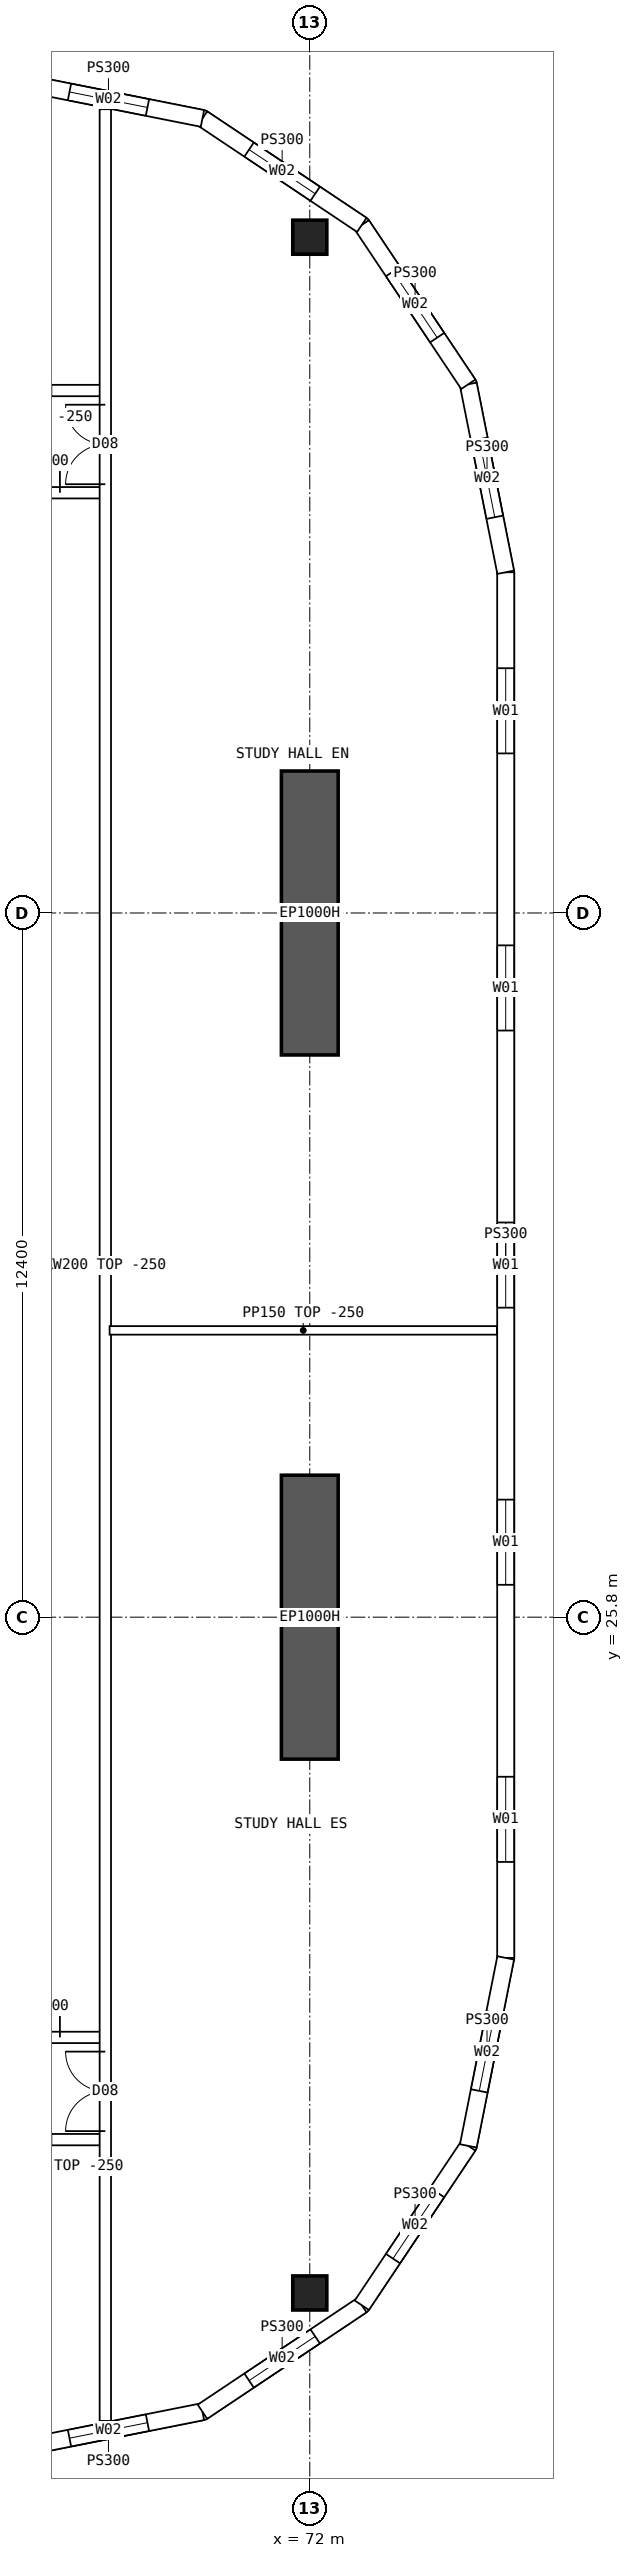
"""IFC4 building model, lengths in metres.
Left out: names, types, materials, properties, quantities, classifications, styles, units other than length and angle.
Written with IfcOpenShell. Run it as: python <this file> out.ifc"""

import sys

from ifc_helpers import new_model, si_unit, direction, frame, frame_2d, origin, origin_2d, place, context, subcontext, project, spatial, polyline, rectangle, hollow_rectangle, outline, extrude, element, fill, save


model = new_model("IFC4")
c1 = context("Model", 3, precision=1e-05, world=origin(), true_north=direction((0.0, 1.0)))
c2 = subcontext(c1, "Body", "Model", "MODEL_VIEW")
j1 = project(units=[si_unit("LENGTHUNIT", "METRE"), si_unit("PLANEANGLEUNIT", "RADIAN")], contexts=[c1])
p1 = place(None, origin())
s1 = spatial("IfcSite", under=j1, at=p1, CompositionType="ELEMENT")
p2 = place(p1, origin())
s2 = spatial("IfcBuilding", under=s1, at=p2, CompositionType="ELEMENT")
p3 = place(p2, frame((0.0, 0.0, 235.3)))
s3 = spatial("IfcBuildingStorey", under=s2, at=p3, CompositionType="ELEMENT", Elevation=235.3)
for number, where, z_axis, x_axis in (
    (1, (72.0, 13.9, 0.0), (0.0, 0.0, 1.0), (1.0, 0.0, 0.0)),
    (2, (72.0, 50.1, 0.0), (0.0, 0.0, 1.0), (1.0, 0.0, 0.0)),
):
    element("IfcColumn", number, at=place(p3, frame(where, z_axis=z_axis, x_axis=x_axis)), inside=s3, PredefinedType="COLUMN", context=c2, shape_type="SweptSolid", body=[
        extrude(hollow_rectangle(XDim=0.6, YDim=0.6, WallThickness=0.06, at=origin_2d()), origin(), (0.0, 0.0, 1.0), 3.75),
    ])
for number, where, z_axis, x_axis in (
    (3, (72.0, 23.3, 0.0), (0.0, 0.0, 1.0), (0.0, 1.0, 0.0)),
    (4, (72.0, 35.7, 0.0), (0.0, 0.0, 1.0), (0.0, 1.0, 0.0)),
):
    element("IfcWall", number, at=place(p3, frame(where, z_axis=z_axis, x_axis=x_axis)), inside=s3, PredefinedType="SHEAR", context=c2, shape_type="SweptSolid", body=[
        extrude(rectangle(XDim=5.0, YDim=1.0, at=frame_2d((2.5, 0.0))), origin(), (0.0, 0.0, 1.0), 3.75),
    ])
p4 = place(p3, frame((75.45, 19.8, 0.0), z_axis=(0.0, 0.0, 1.0), x_axis=(0.0, 1.0, 0.0)))
e5 = element("IfcWall", 5, at=p4, inside=s3, PredefinedType="SOLIDWALL", context=c2, shape_type="SweptSolid", body=[
    extrude(outline(polyline([(-0.015, -0.15), (24.415, -0.15), (24.385, 0.15), (0.015, 0.15), (-0.015, -0.15)])), origin(), (0.0, 0.0, 1.0), 3.5),
])
p5 = place(p4, frame((1.69, 0.0, 0.9)))
e6 = element("IfcOpeningElement", 6, at=p5, cuts=e5, PredefinedType="OPENING", context=c2, shape_type="SweptSolid", body=[
    extrude(rectangle(XDim=1.5, YDim=2.0, at=frame_2d((0.75, 1.0))), frame((0.0, 0.16, 0.0), z_axis=(0.0, -1.0, 0.0), x_axis=(1.0, 0.0, 0.0)), (0.0, 0.0, 1.0), 0.32),
])
p6 = place(p4, frame((6.57, 0.0, 0.9)))
e7 = element("IfcOpeningElement", 7, at=p6, cuts=e5, PredefinedType="OPENING", context=c2, shape_type="SweptSolid", body=[
    extrude(rectangle(XDim=1.5, YDim=2.0, at=frame_2d((0.75, 1.0))), frame((0.0, 0.16, 0.0), z_axis=(0.0, -1.0, 0.0), x_axis=(1.0, 0.0, 0.0)), (0.0, 0.0, 1.0), 0.32),
])
p7 = place(p4, frame((11.45, 0.0, 0.9)))
e8 = element("IfcOpeningElement", 8, at=p7, cuts=e5, PredefinedType="OPENING", context=c2, shape_type="SweptSolid", body=[
    extrude(rectangle(XDim=1.5, YDim=2.0, at=frame_2d((0.75, 1.0))), frame((0.0, 0.16, 0.0), z_axis=(0.0, -1.0, 0.0), x_axis=(1.0, 0.0, 0.0)), (0.0, 0.0, 1.0), 0.32),
])
p8 = place(p4, frame((16.33, 0.0, 0.9)))
e9 = element("IfcOpeningElement", 9, at=p8, cuts=e5, PredefinedType="OPENING", context=c2, shape_type="SweptSolid", body=[
    extrude(rectangle(XDim=1.5, YDim=2.0, at=frame_2d((0.75, 1.0))), frame((0.0, 0.16, 0.0), z_axis=(0.0, -1.0, 0.0), x_axis=(1.0, 0.0, 0.0)), (0.0, 0.0, 1.0), 0.32),
])
p9 = place(p4, frame((21.21, 0.0, 0.9)))
e10 = element("IfcOpeningElement", 10, at=p9, cuts=e5, PredefinedType="OPENING", context=c2, shape_type="SweptSolid", body=[
    extrude(rectangle(XDim=1.5, YDim=2.0, at=frame_2d((0.75, 1.0))), frame((0.0, 0.16, 0.0), z_axis=(0.0, -1.0, 0.0), x_axis=(1.0, 0.0, 0.0)), (0.0, 0.0, 1.0), 0.32),
])
p10 = place(p3, frame((66.8, 11.15, 0.0), z_axis=(0.0, 0.0, 1.0), x_axis=(0.98078325777, 0.195100490205, 0.0)))
e11 = element("IfcWall", 11, at=p10, inside=s3, PredefinedType="SOLIDWALL", context=c2, shape_type="SweptSolid", body=[
    extrude(outline(polyline([(-0.03, -0.15), (3.405, -0.15), (3.345, 0.15), (0.03, 0.15), (-0.03, -0.15)])), origin(), (0.0, 0.0, 1.0), 3.5),
])
p11 = place(p10, frame((0.988, 0.0, 0.9)))
e12 = element("IfcOpeningElement", 12, at=p11, cuts=e11, PredefinedType="OPENING", context=c2, shape_type="SweptSolid", body=[
    extrude(rectangle(XDim=1.4, YDim=1.8, at=frame_2d((0.7, 0.9))), frame((0.0, 0.16, 0.0), z_axis=(0.0, -1.0, 0.0), x_axis=(1.0, 0.0, 0.0)), (0.0, 0.0, 1.0), 0.32),
])
p12 = place(p3, frame((70.11, 11.808, 0.0), z_axis=(0.0, 0.0, 1.0), x_axis=(0.831460037396, 0.555584562613, 0.0)))
e13 = element("IfcWall", 13, at=p12, inside=s3, PredefinedType="SOLIDWALL", context=c2, shape_type="SweptSolid", body=[
    extrude(outline(polyline([(-0.03, -0.15), (3.405, -0.15), (3.345, 0.15), (0.03, 0.15), (-0.03, -0.15)])), origin(), (0.0, 0.0, 1.0), 3.5),
])
p13 = place(p12, frame((0.988, 0.0, 0.9)))
e14 = element("IfcOpeningElement", 14, at=p13, cuts=e13, PredefinedType="OPENING", context=c2, shape_type="SweptSolid", body=[
    extrude(rectangle(XDim=1.4, YDim=1.8, at=frame_2d((0.7, 0.9))), frame((0.0, 0.16, 0.0), z_axis=(0.0, -1.0, 0.0), x_axis=(1.0, 0.0, 0.0)), (0.0, 0.0, 1.0), 0.32),
])
p14 = place(p3, frame((72.917, 13.684, 0.0), z_axis=(0.0, 0.0, 1.0), x_axis=(0.555567969291, 0.831471124873, 0.0)))
e15 = element("IfcWall", 15, at=p14, inside=s3, PredefinedType="SOLIDWALL", context=c2, shape_type="SweptSolid", body=[
    extrude(outline(polyline([(-0.03, -0.15), (3.405, -0.15), (3.345, 0.15), (0.03, 0.15), (-0.03, -0.15)])), origin(), (0.0, 0.0, 1.0), 3.5),
])
p15 = place(p14, frame((0.988, 0.0, 0.9)))
e16 = element("IfcOpeningElement", 16, at=p15, cuts=e15, PredefinedType="OPENING", context=c2, shape_type="SweptSolid", body=[
    extrude(rectangle(XDim=1.4, YDim=1.8, at=frame_2d((0.7, 0.9))), frame((0.0, 0.16, 0.0), z_axis=(0.0, -1.0, 0.0), x_axis=(1.0, 0.0, 0.0)), (0.0, 0.0, 1.0), 0.32),
])
p16 = place(p3, frame((74.792, 16.49, 0.0), z_axis=(0.0, 0.0, 1.0), x_axis=(0.19508664885, 0.980786011034, 0.0)))
e17 = element("IfcWall", 17, at=p16, inside=s3, PredefinedType="SOLIDWALL", context=c2, shape_type="SweptSolid", body=[
    extrude(outline(polyline([(-0.03, -0.15), (3.39, -0.15), (3.36, 0.15), (0.03, 0.15), (-0.03, -0.15)])), origin(), (0.0, 0.0, 1.0), 3.5),
])
p17 = place(p16, frame((0.988, 0.0, 0.9)))
e18 = element("IfcOpeningElement", 18, at=p17, cuts=e17, PredefinedType="OPENING", context=c2, shape_type="SweptSolid", body=[
    extrude(rectangle(XDim=1.4, YDim=1.8, at=frame_2d((0.7, 0.9))), frame((0.0, 0.16, 0.0), z_axis=(0.0, -1.0, 0.0), x_axis=(1.0, 0.0, 0.0)), (0.0, 0.0, 1.0), 0.32),
])
p18 = place(p3, frame((75.45, 44.2, 0.0), z_axis=(0.0, 0.0, 1.0), x_axis=(-0.19508664885, 0.980786011034, 0.0)))
e19 = element("IfcWall", 19, at=p18, inside=s3, PredefinedType="SOLIDWALL", context=c2, shape_type="SweptSolid", body=[
    extrude(outline(polyline([(-0.015, -0.15), (3.405, -0.15), (3.345, 0.15), (0.015, 0.15), (-0.015, -0.15)])), origin(), (0.0, 0.0, 1.0), 3.5),
])
p19 = place(p18, frame((0.988, 0.0, 0.9)))
e20 = element("IfcOpeningElement", 20, at=p19, cuts=e19, PredefinedType="OPENING", context=c2, shape_type="SweptSolid", body=[
    extrude(rectangle(XDim=1.4, YDim=1.8, at=frame_2d((0.7, 0.9))), frame((0.0, 0.16, 0.0), z_axis=(0.0, -1.0, 0.0), x_axis=(1.0, 0.0, 0.0)), (0.0, 0.0, 1.0), 0.32),
])
p20 = place(p3, frame((74.792, 47.51, 0.0), z_axis=(0.0, 0.0, 1.0), x_axis=(-0.555567969291, 0.831471124873, 0.0)))
e21 = element("IfcWall", 21, at=p20, inside=s3, PredefinedType="SOLIDWALL", context=c2, shape_type="SweptSolid", body=[
    extrude(outline(polyline([(-0.03, -0.15), (3.405, -0.15), (3.345, 0.15), (0.03, 0.15), (-0.03, -0.15)])), origin(), (0.0, 0.0, 1.0), 3.5),
])
p21 = place(p20, frame((0.988, 0.0, 0.9)))
e22 = element("IfcOpeningElement", 22, at=p21, cuts=e21, PredefinedType="OPENING", context=c2, shape_type="SweptSolid", body=[
    extrude(rectangle(XDim=1.4, YDim=1.8, at=frame_2d((0.7, 0.9))), frame((0.0, 0.16, 0.0), z_axis=(0.0, -1.0, 0.0), x_axis=(1.0, 0.0, 0.0)), (0.0, 0.0, 1.0), 0.32),
])
p22 = place(p3, frame((72.917, 50.316, 0.0), z_axis=(0.0, 0.0, 1.0), x_axis=(-0.831460037396, 0.555584562613, 0.0)))
e23 = element("IfcWall", 23, at=p22, inside=s3, PredefinedType="SOLIDWALL", context=c2, shape_type="SweptSolid", body=[
    extrude(outline(polyline([(-0.03, -0.15), (3.405, -0.15), (3.345, 0.15), (0.03, 0.15), (-0.03, -0.15)])), origin(), (0.0, 0.0, 1.0), 3.5),
])
p23 = place(p22, frame((0.988, 0.0, 0.9)))
e24 = element("IfcOpeningElement", 24, at=p23, cuts=e23, PredefinedType="OPENING", context=c2, shape_type="SweptSolid", body=[
    extrude(rectangle(XDim=1.4, YDim=1.8, at=frame_2d((0.7, 0.9))), frame((0.0, 0.16, 0.0), z_axis=(0.0, -1.0, 0.0), x_axis=(1.0, 0.0, 0.0)), (0.0, 0.0, 1.0), 0.32),
])
p24 = place(p3, frame((70.11, 52.192, 0.0), z_axis=(0.0, 0.0, 1.0), x_axis=(-0.98078325777, 0.195100490205, 0.0)))
e25 = element("IfcWall", 25, at=p24, inside=s3, PredefinedType="SOLIDWALL", context=c2, shape_type="SweptSolid", body=[
    extrude(outline(polyline([(-0.03, -0.15), (3.405, -0.15), (3.345, 0.15), (0.03, 0.15), (-0.03, -0.15)])), origin(), (0.0, 0.0, 1.0), 3.5),
])
p25 = place(p24, frame((0.988, 0.0, 0.9)))
e26 = element("IfcOpeningElement", 26, at=p25, cuts=e25, PredefinedType="OPENING", context=c2, shape_type="SweptSolid", body=[
    extrude(rectangle(XDim=1.4, YDim=1.8, at=frame_2d((0.7, 0.9))), frame((0.0, 0.16, 0.0), z_axis=(0.0, -1.0, 0.0), x_axis=(1.0, 0.0, 0.0)), (0.0, 0.0, 1.0), 0.32),
])
p26 = place(p3, frame((66.35, 16.6, 0.0), z_axis=(0.0, 0.0, 1.0), x_axis=(1.0, 0.0, 0.0)))
e27 = element("IfcWall", 27, at=p26, inside=s3, PredefinedType="SOLIDWALL", context=c2, shape_type="SweptSolid", body=[
    extrude(rectangle(XDim=2.05, YDim=0.2, at=frame_2d((1.025, 0.0))), origin(), (0.0, 0.0, 1.0), 3.5),
])
p27 = place(p26, frame((0.2, 0.0, 0.0)))
e28 = element("IfcOpeningElement", 28, at=p27, cuts=e27, PredefinedType="OPENING", context=c2, shape_type="SweptSolid", body=[
    extrude(rectangle(XDim=0.9, YDim=2.1, at=frame_2d((0.45, 1.05))), frame((0.0, 0.11, 0.0), z_axis=(0.0, -1.0, 0.0), x_axis=(1.0, 0.0, 0.0)), (0.0, 0.0, 1.0), 0.22),
])
p28 = place(p3, frame((66.35, 18.4, 0.0), z_axis=(0.0, 0.0, 1.0), x_axis=(1.0, 0.0, 0.0)))
e29 = element("IfcWall", 29, at=p28, inside=s3, PredefinedType="SOLIDWALL", context=c2, shape_type="SweptSolid", body=[
    extrude(rectangle(XDim=2.05, YDim=0.2, at=frame_2d((1.025, 0.0))), origin(), (0.0, 0.0, 1.0), 3.5),
])
p29 = place(p28, frame((0.05, 0.0, 0.0)))
e30 = element("IfcOpeningElement", 30, at=p29, cuts=e29, PredefinedType="OPENING", context=c2, shape_type="SweptSolid", body=[
    extrude(rectangle(XDim=1.2, YDim=2.1, at=frame_2d((0.6, 1.05))), frame((0.0, 0.11, 0.0), z_axis=(0.0, -1.0, 0.0), x_axis=(1.0, 0.0, 0.0)), (0.0, 0.0, 1.0), 0.22),
])
p30 = place(p3, frame((66.35, 47.4, 0.0), z_axis=(0.0, 0.0, 1.0), x_axis=(1.0, 0.0, 0.0)))
e31 = element("IfcWall", 31, at=p30, inside=s3, PredefinedType="SOLIDWALL", context=c2, shape_type="SweptSolid", body=[
    extrude(rectangle(XDim=2.05, YDim=0.2, at=frame_2d((1.025, 0.0))), origin(), (0.0, 0.0, 1.0), 3.5),
])
p31 = place(p30, frame((0.2, 0.0, 0.0)))
e32 = element("IfcOpeningElement", 32, at=p31, cuts=e31, PredefinedType="OPENING", context=c2, shape_type="SweptSolid", body=[
    extrude(rectangle(XDim=0.9, YDim=2.1, at=frame_2d((0.45, 1.05))), frame((0.0, 0.11, 0.0), z_axis=(0.0, -1.0, 0.0), x_axis=(1.0, 0.0, 0.0)), (0.0, 0.0, 1.0), 0.22),
])
p32 = place(p3, frame((66.35, 45.6, 0.0), z_axis=(0.0, 0.0, 1.0), x_axis=(1.0, 0.0, 0.0)))
e33 = element("IfcWall", 33, at=p32, inside=s3, PredefinedType="SOLIDWALL", context=c2, shape_type="SweptSolid", body=[
    extrude(rectangle(XDim=2.05, YDim=0.2, at=frame_2d((1.025, 0.0))), origin(), (0.0, 0.0, 1.0), 3.5),
])
p33 = place(p32, frame((0.05, 0.0, 0.0)))
e34 = element("IfcOpeningElement", 34, at=p33, cuts=e33, PredefinedType="OPENING", context=c2, shape_type="SweptSolid", body=[
    extrude(rectangle(XDim=1.2, YDim=2.1, at=frame_2d((0.6, 1.05))), frame((0.0, 0.11, 0.0), z_axis=(0.0, -1.0, 0.0), x_axis=(1.0, 0.0, 0.0)), (0.0, 0.0, 1.0), 0.22),
])
p34 = place(p3, frame((68.475, 30.85, 0.0), z_axis=(0.0, 0.0, 1.0), x_axis=(1.0, 0.0, 0.0)))
e35 = element("IfcWall", 35, at=p34, inside=s3, PredefinedType="PARTITIONING", context=c2, shape_type="SweptSolid", body=[
    extrude(outline(polyline([(0.0, 0.0), (6.82, 0.0), (6.82, 3.5), (3.827, 3.5), (3.825, 3.05), (3.227, 3.05), (3.225, 3.5), (0.0, 3.5), (0.0, 0.0)])), frame((0.0, 0.075, 0.0), z_axis=(0.0, -1.0, 0.0), x_axis=(1.0, 0.0, 0.0)), (0.0, 0.0, 1.0), 0.15),
])
p35 = place(p3, frame((68.4, 11.646, 0.0), z_axis=(0.0, 0.0, 1.0), x_axis=(0.0, 1.0, 0.0)))
e36 = element("IfcWall", 36, at=p35, inside=s3, PredefinedType="SOLIDWALL", context=c2, shape_type="SweptSolid", body=[
    extrude(rectangle(XDim=40.708, YDim=0.2, at=frame_2d((20.354, 0.0))), origin(), (0.0, 0.0, 1.0), 3.5),
])
p36 = place(p35, frame((5.104, 0.0, 0.0)))
e37 = element("IfcOpeningElement", 37, at=p36, cuts=e36, PredefinedType="OPENING", context=c2, shape_type="SweptSolid", body=[
    extrude(rectangle(XDim=1.4, YDim=2.1, at=frame_2d((0.7, 1.05))), frame((0.0, 0.11, 0.0), z_axis=(0.0, -1.0, 0.0), x_axis=(1.0, 0.0, 0.0)), (0.0, 0.0, 1.0), 0.22),
])
p37 = place(p35, frame((34.104, 0.0, 0.0)))
e38 = element("IfcOpeningElement", 38, at=p37, cuts=e36, PredefinedType="OPENING", context=c2, shape_type="SweptSolid", body=[
    extrude(rectangle(XDim=1.4, YDim=2.1, at=frame_2d((0.7, 1.05))), frame((0.0, 0.11, 0.0), z_axis=(0.0, -1.0, 0.0), x_axis=(1.0, 0.0, 0.0)), (0.0, 0.0, 1.0), 0.22),
])
p38 = place(p5, origin())
e39 = element("IfcWindow", 39, at=p38, inside=s3, PartitioningType="SINGLE_PANEL", PredefinedType="WINDOW", context=c2, shape_type="SweptSolid", body=[
    extrude(rectangle(XDim=1.5, YDim=2.0, at=frame_2d((0.75, 1.0))), frame((0.0, 0.03, 0.0), z_axis=(0.0, -1.0, 0.0), x_axis=(1.0, 0.0, 0.0)), (0.0, 0.0, 1.0), 0.06),
])
fill(e6, e39)
p39 = place(p6, origin())
e40 = element("IfcWindow", 40, at=p39, inside=s3, PartitioningType="SINGLE_PANEL", PredefinedType="WINDOW", context=c2, shape_type="SweptSolid", body=[
    extrude(rectangle(XDim=1.5, YDim=2.0, at=frame_2d((0.75, 1.0))), frame((0.0, 0.03, 0.0), z_axis=(0.0, -1.0, 0.0), x_axis=(1.0, 0.0, 0.0)), (0.0, 0.0, 1.0), 0.06),
])
fill(e7, e40)
p40 = place(p7, origin())
e41 = element("IfcWindow", 41, at=p40, inside=s3, PartitioningType="SINGLE_PANEL", PredefinedType="WINDOW", context=c2, shape_type="SweptSolid", body=[
    extrude(rectangle(XDim=1.5, YDim=2.0, at=frame_2d((0.75, 1.0))), frame((0.0, 0.03, 0.0), z_axis=(0.0, -1.0, 0.0), x_axis=(1.0, 0.0, 0.0)), (0.0, 0.0, 1.0), 0.06),
])
fill(e8, e41)
p41 = place(p8, origin())
e42 = element("IfcWindow", 42, at=p41, inside=s3, PartitioningType="SINGLE_PANEL", PredefinedType="WINDOW", context=c2, shape_type="SweptSolid", body=[
    extrude(rectangle(XDim=1.5, YDim=2.0, at=frame_2d((0.75, 1.0))), frame((0.0, 0.03, 0.0), z_axis=(0.0, -1.0, 0.0), x_axis=(1.0, 0.0, 0.0)), (0.0, 0.0, 1.0), 0.06),
])
fill(e9, e42)
p42 = place(p9, origin())
e43 = element("IfcWindow", 43, at=p42, inside=s3, PartitioningType="SINGLE_PANEL", PredefinedType="WINDOW", context=c2, shape_type="SweptSolid", body=[
    extrude(rectangle(XDim=1.5, YDim=2.0, at=frame_2d((0.75, 1.0))), frame((0.0, 0.03, 0.0), z_axis=(0.0, -1.0, 0.0), x_axis=(1.0, 0.0, 0.0)), (0.0, 0.0, 1.0), 0.06),
])
fill(e10, e43)
p43 = place(p11, origin())
e44 = element("IfcWindow", 44, at=p43, inside=s3, PartitioningType="SINGLE_PANEL", PredefinedType="WINDOW", context=c2, shape_type="SweptSolid", body=[
    extrude(rectangle(XDim=1.4, YDim=1.8, at=frame_2d((0.7, 0.9))), frame((0.0, 0.03, 0.0), z_axis=(0.0, -1.0, 0.0), x_axis=(1.0, 0.0, 0.0)), (0.0, 0.0, 1.0), 0.06),
])
fill(e12, e44)
p44 = place(p13, origin())
e45 = element("IfcWindow", 45, at=p44, inside=s3, PartitioningType="SINGLE_PANEL", PredefinedType="WINDOW", context=c2, shape_type="SweptSolid", body=[
    extrude(rectangle(XDim=1.4, YDim=1.8, at=frame_2d((0.7, 0.9))), frame((0.0, 0.03, 0.0), z_axis=(0.0, -1.0, 0.0), x_axis=(1.0, 0.0, 0.0)), (0.0, 0.0, 1.0), 0.06),
])
fill(e14, e45)
p45 = place(p15, origin())
e46 = element("IfcWindow", 46, at=p45, inside=s3, PartitioningType="SINGLE_PANEL", PredefinedType="WINDOW", context=c2, shape_type="SweptSolid", body=[
    extrude(rectangle(XDim=1.4, YDim=1.8, at=frame_2d((0.7, 0.9))), frame((0.0, 0.03, 0.0), z_axis=(0.0, -1.0, 0.0), x_axis=(1.0, 0.0, 0.0)), (0.0, 0.0, 1.0), 0.06),
])
fill(e16, e46)
p46 = place(p17, origin())
e47 = element("IfcWindow", 47, at=p46, inside=s3, PartitioningType="SINGLE_PANEL", PredefinedType="WINDOW", context=c2, shape_type="SweptSolid", body=[
    extrude(rectangle(XDim=1.4, YDim=1.8, at=frame_2d((0.7, 0.9))), frame((0.0, 0.03, 0.0), z_axis=(0.0, -1.0, 0.0), x_axis=(1.0, 0.0, 0.0)), (0.0, 0.0, 1.0), 0.06),
])
fill(e18, e47)
p47 = place(p19, origin())
e48 = element("IfcWindow", 48, at=p47, inside=s3, PartitioningType="SINGLE_PANEL", PredefinedType="WINDOW", context=c2, shape_type="SweptSolid", body=[
    extrude(rectangle(XDim=1.4, YDim=1.8, at=frame_2d((0.7, 0.9))), frame((0.0, 0.03, 0.0), z_axis=(0.0, -1.0, 0.0), x_axis=(1.0, 0.0, 0.0)), (0.0, 0.0, 1.0), 0.06),
])
fill(e20, e48)
p48 = place(p21, origin())
e49 = element("IfcWindow", 49, at=p48, inside=s3, PartitioningType="SINGLE_PANEL", PredefinedType="WINDOW", context=c2, shape_type="SweptSolid", body=[
    extrude(rectangle(XDim=1.4, YDim=1.8, at=frame_2d((0.7, 0.9))), frame((0.0, 0.03, 0.0), z_axis=(0.0, -1.0, 0.0), x_axis=(1.0, 0.0, 0.0)), (0.0, 0.0, 1.0), 0.06),
])
fill(e22, e49)
p49 = place(p23, origin())
e50 = element("IfcWindow", 50, at=p49, inside=s3, PartitioningType="SINGLE_PANEL", PredefinedType="WINDOW", context=c2, shape_type="SweptSolid", body=[
    extrude(rectangle(XDim=1.4, YDim=1.8, at=frame_2d((0.7, 0.9))), frame((0.0, 0.03, 0.0), z_axis=(0.0, -1.0, 0.0), x_axis=(1.0, 0.0, 0.0)), (0.0, 0.0, 1.0), 0.06),
])
fill(e24, e50)
p50 = place(p25, origin())
e51 = element("IfcWindow", 51, at=p50, inside=s3, PartitioningType="SINGLE_PANEL", PredefinedType="WINDOW", context=c2, shape_type="SweptSolid", body=[
    extrude(rectangle(XDim=1.4, YDim=1.8, at=frame_2d((0.7, 0.9))), frame((0.0, 0.03, 0.0), z_axis=(0.0, -1.0, 0.0), x_axis=(1.0, 0.0, 0.0)), (0.0, 0.0, 1.0), 0.06),
])
fill(e26, e51)
p51 = place(p29, origin())
e52 = element("IfcDoor", 52, at=p51, inside=s3, OperationType="DOUBLE_DOOR_SINGLE_SWING", PredefinedType="DOOR", context=c2, shape_type="SweptSolid", body=[
    extrude(rectangle(XDim=1.2, YDim=2.1, at=frame_2d((0.6, 1.05))), frame((0.0, 0.025, 0.0), z_axis=(0.0, -1.0, 0.0), x_axis=(1.0, 0.0, 0.0)), (0.0, 0.0, 1.0), 0.05),
])
fill(e30, e52)
p52 = place(p33, origin())
e53 = element("IfcDoor", 53, at=p52, inside=s3, OperationType="DOUBLE_DOOR_SINGLE_SWING", PredefinedType="DOOR", context=c2, shape_type="SweptSolid", body=[
    extrude(rectangle(XDim=1.2, YDim=2.1, at=frame_2d((0.6, 1.05))), frame((0.0, 0.025, 0.0), z_axis=(0.0, -1.0, 0.0), x_axis=(1.0, 0.0, 0.0)), (0.0, 0.0, 1.0), 0.05),
])
fill(e34, e53)
p53 = place(p36, origin())
e54 = element("IfcDoor", 54, at=p53, inside=s3, OperationType="DOUBLE_DOOR_SINGLE_SWING", PredefinedType="DOOR", context=c2, shape_type="SweptSolid", body=[
    extrude(rectangle(XDim=1.4, YDim=2.1, at=frame_2d((0.7, 1.05))), frame((0.0, 0.025, 0.0), z_axis=(0.0, -1.0, 0.0), x_axis=(1.0, 0.0, 0.0)), (0.0, 0.0, 1.0), 0.05),
])
fill(e37, e54)
p54 = place(p37, origin())
e55 = element("IfcDoor", 55, at=p54, inside=s3, OperationType="DOUBLE_DOOR_SINGLE_SWING", PredefinedType="DOOR", context=c2, shape_type="SweptSolid", body=[
    extrude(rectangle(XDim=1.4, YDim=2.1, at=frame_2d((0.7, 1.05))), frame((0.0, 0.025, 0.0), z_axis=(0.0, -1.0, 0.0), x_axis=(1.0, 0.0, 0.0)), (0.0, 0.0, 1.0), 0.05),
])
fill(e38, e55)
save(model, sys.argv[1])
